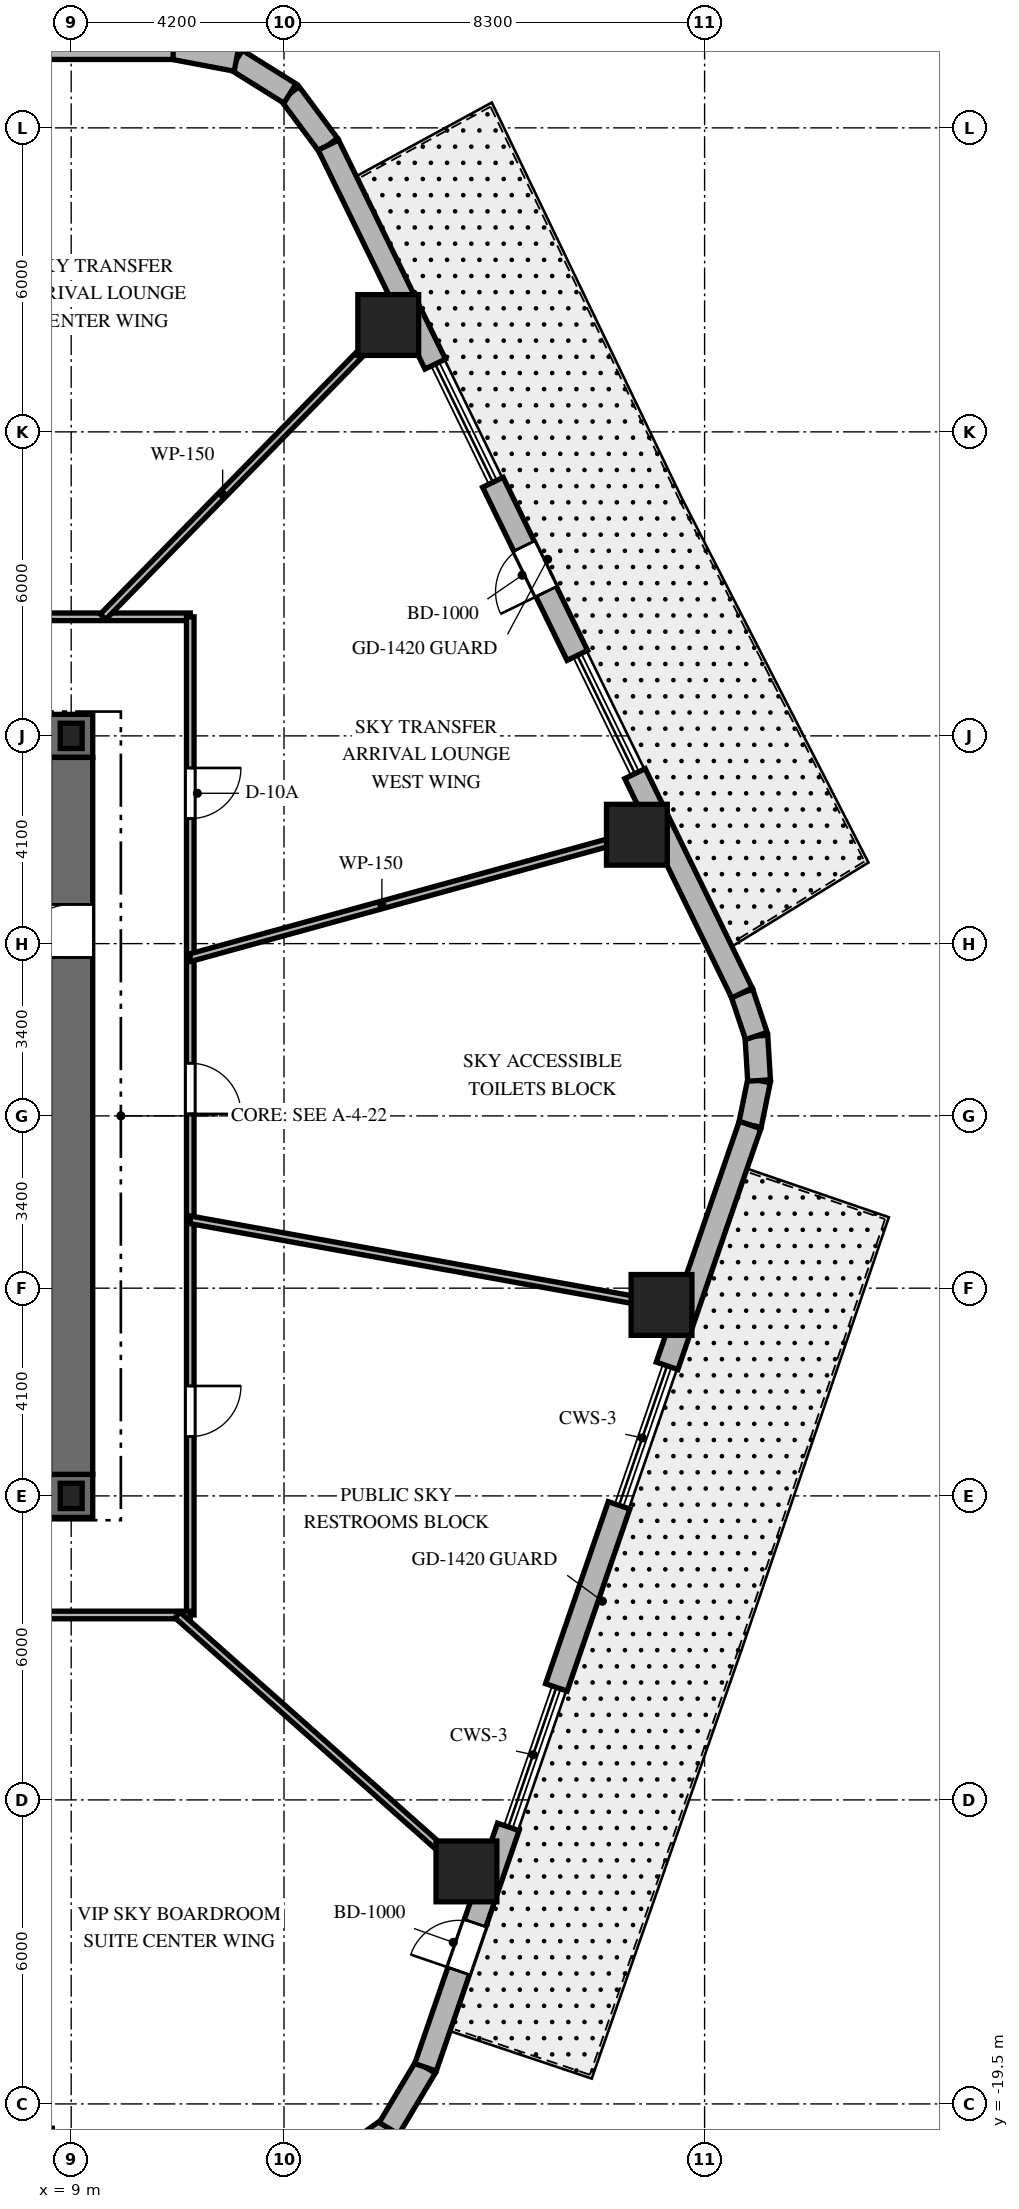
"""IFC4 building model, lengths in metres.
Left out: names, types, materials, properties, quantities, classifications, styles, units other than length and angle.
Written with IfcOpenShell. Run it as: python <this file> out.ifc"""

import sys

from ifc_helpers import new_model, si_unit, direction, frame, frame_2d, origin, origin_2d, place, context, subcontext, project, spatial, rectangle, i_section, extrude, element, fill, save


model = new_model("IFC4")
c1 = context("Model", 3, precision=1e-05, world=origin(), true_north=direction((0.0, 1.0)))
c2 = subcontext(c1, "Body", "Model", "MODEL_VIEW")
j1 = project(units=[si_unit("LENGTHUNIT", "METRE"), si_unit("PLANEANGLEUNIT", "RADIAN")], contexts=[c1])
p1 = place(None, origin())
s1 = spatial("IfcSite", under=j1, at=p1, CompositionType="ELEMENT")
p2 = place(p1, origin())
s2 = spatial("IfcBuilding", under=s1, at=p2, CompositionType="ELEMENT")
p3 = place(p2, frame((0.0, 0.0, 139.5)))
s3 = spatial("IfcBuildingStorey", under=s2, at=p3, CompositionType="ELEMENT", Elevation=139.5)
p4 = place(p3, frame((-9.425, -7.5, 0.0), z_axis=(0.0, 0.0, 1.0), x_axis=(1.0, 0.0, 0.0)))
e1 = element("IfcWall", 1, at=p4, inside=s3, PredefinedType="SHEAR", context=c2, shape_type="SweptSolid", body=[
    extrude(rectangle(XDim=18.85, YDim=0.85, at=frame_2d((9.425, 0.0))), origin(), (0.0, 0.0, 1.0), 4.8),
])
p5 = place(p4, frame((9.475, 0.0, 0.0)))
e2 = element("IfcOpeningElement", 2, at=p5, cuts=e1, PredefinedType="OPENING", context=c2, shape_type="SweptSolid", body=[
    extrude(rectangle(XDim=1.0, YDim=2.15, at=frame_2d((0.5, 1.075))), frame((0.0, 0.435, 0.0), z_axis=(0.0, -1.0, 0.0), x_axis=(1.0, 0.0, 0.0)), (0.0, 0.0, 1.0), 0.87),
])
p6 = place(p3, frame((1.85, 7.5, 0.0), z_axis=(0.0, 0.0, 1.0), x_axis=(1.0, 0.0, 0.0)))
e3 = element("IfcWall", 3, at=p6, inside=s3, PredefinedType="SHEAR", context=c2, shape_type="SweptSolid", body=[
    extrude(rectangle(XDim=7.575, YDim=0.85, at=frame_2d((3.788, 0.0))), origin(), (0.0, 0.0, 1.0), 4.8),
])
p7 = place(p3, frame((9.0, -7.075, 0.0), z_axis=(0.0, 0.0, 1.0), x_axis=(0.0, 1.0, 0.0)))
e4 = element("IfcWall", 4, at=p7, inside=s3, PredefinedType="SHEAR", context=c2, shape_type="SweptSolid", body=[
    extrude(rectangle(XDim=14.15, YDim=0.85, at=frame_2d((7.075, 0.0))), origin(), (0.0, 0.0, 1.0), 4.8),
])
p8 = place(p7, frame((10.2, 0.0, 0.0)))
e5 = element("IfcOpeningElement", 5, at=p8, cuts=e4, PredefinedType="OPENING", context=c2, shape_type="SweptSolid", body=[
    extrude(rectangle(XDim=1.05, YDim=2.15, at=frame_2d((0.525, 1.075))), frame((0.0, 0.435, 0.0), z_axis=(0.0, -1.0, 0.0), x_axis=(1.0, 0.0, 0.0)), (0.0, 0.0, 1.0), 0.87),
])
for number, where, z_axis, x_axis in (
    (6, (9.0, -7.5, 0.0), (0.0, 0.0, 1.0), (1.0, 0.0, 0.0)),
    (7, (9.0, 7.5, 0.0), (0.0, 0.0, 1.0), (1.0, 0.0, 0.0)),
):
    element("IfcColumn", number, at=place(p3, frame(where, z_axis=z_axis, x_axis=x_axis)), inside=s3, PredefinedType="COLUMN", context=c2, shape_type="SweptSolid", body=[
        extrude(i_section(OverallWidth=0.432, OverallDepth=0.498, WebThickness=0.056, FlangeThickness=0.089, at=origin_2d()), origin(), (0.0, 0.0, 1.0), 4.8),
    ])
for number, where, z_axis, x_axis in (
    (8, (8.028, -20.58, 0.0), (0.0, 0.0, 1.0), (1.0, 0.0, 0.0)),
    (9, (16.8, -14.911, 0.0), (0.0, 0.0, 1.0), (1.0, 0.0, 0.0)),
    (10, (20.65, -3.731, 0.0), (0.0, 0.0, 1.0), (1.0, 0.0, 0.0)),
    (11, (20.164, 5.549, 0.0), (0.0, 0.0, 1.0), (1.0, 0.0, 0.0)),
    (12, (15.257, 15.609, 0.0), (0.0, 0.0, 1.0), (1.0, 0.0, 0.0)),
):
    element("IfcColumn", number, at=place(p3, frame(where, z_axis=z_axis, x_axis=x_axis)), inside=s3, PredefinedType="COLUMN", context=c2, shape_type="SweptSolid", body=[
        extrude(rectangle(XDim=1.2, YDim=1.2, at=origin_2d()), origin(), (0.0, 0.0, 1.0), 4.8),
    ])
p9 = place(p3, frame((14.146, -20.787, 0.0), z_axis=(0.0, 0.0, 1.0), x_axis=(0.814162929117, 0.580636482536, 0.0)))
e13 = element("IfcWall", 13, at=p9, inside=s3, PredefinedType="SOLIDWALL", context=c2, shape_type="SweptSolid", body=[
    extrude(rectangle(XDim=1.382, YDim=0.45, at=frame_2d((0.691, 0.0))), origin(), (0.0, 0.0, 1.0), 4.5),
])
p10 = place(p3, frame((15.272, -19.984, 0.0), z_axis=(0.0, 0.0, 1.0), x_axis=(0.512579347361, 0.858639862025, 0.0)))
e14 = element("IfcWall", 14, at=p10, inside=s3, PredefinedType="SOLIDWALL", context=c2, shape_type="SweptSolid", body=[
    extrude(rectangle(XDim=1.406, YDim=0.45, at=frame_2d((0.703, 0.0))), origin(), (0.0, 0.0, 1.0), 4.5),
])
p11 = place(p3, frame((22.397, -0.179, 0.0), z_axis=(0.0, 0.0, 1.0), x_axis=(0.199313589404, 0.979935759669, 0.0)))
e15 = element("IfcWall", 15, at=p11, inside=s3, PredefinedType="SOLIDWALL", context=c2, shape_type="SweptSolid", body=[
    extrude(rectangle(XDim=0.896, YDim=0.45, at=frame_2d((0.448, 0.0))), origin(), (0.0, 0.0, 1.0), 4.5),
])
p12 = place(p3, frame((22.575, 0.698, 0.0), z_axis=(0.0, 0.0, 1.0), x_axis=(-0.060980441946, 0.998138961117, 0.0)))
e16 = element("IfcWall", 16, at=p12, inside=s3, PredefinedType="SOLIDWALL", context=c2, shape_type="SweptSolid", body=[
    extrude(rectangle(XDim=0.881, YDim=0.45, at=frame_2d((0.44, 0.0))), origin(), (0.0, 0.0, 1.0), 4.5),
])
p13 = place(p3, frame((22.522, 1.577, 0.0), z_axis=(0.0, 0.0, 1.0), x_axis=(-0.317372694837, 0.948300887151, 0.0)))
e17 = element("IfcWall", 17, at=p13, inside=s3, PredefinedType="SOLIDWALL", context=c2, shape_type="SweptSolid", body=[
    extrude(rectangle(XDim=0.896, YDim=0.45, at=frame_2d((0.448, 0.0))), origin(), (0.0, 0.0, 1.0), 4.5),
])
p14 = place(p3, frame((14.076, 19.161, 0.0), z_axis=(0.0, 0.0, 1.0), x_axis=(-0.597226657159, 0.802072515412, 0.0)))
e18 = element("IfcWall", 18, at=p14, inside=s3, PredefinedType="SOLIDWALL", context=c2, shape_type="SweptSolid", body=[
    extrude(rectangle(XDim=1.269, YDim=0.45, at=frame_2d((0.635, 0.0))), origin(), (0.0, 0.0, 1.0), 4.5),
])
p15 = place(p3, frame((13.318, 20.179, 0.0), z_axis=(0.0, 0.0, 1.0), x_axis=(-0.848031272749, 0.529946186362, 0.0)))
e19 = element("IfcWall", 19, at=p15, inside=s3, PredefinedType="SOLIDWALL", context=c2, shape_type="SweptSolid", body=[
    extrude(rectangle(XDim=1.248, YDim=0.45, at=frame_2d((0.624, 0.0))), origin(), (0.0, 0.0, 1.0), 4.5),
])
p16 = place(p3, frame((12.259, 20.84, 0.0), z_axis=(0.0, 0.0, 1.0), x_axis=(-0.982730354425, 0.185043374624, 0.0)))
e20 = element("IfcWall", 20, at=p16, inside=s3, PredefinedType="SOLIDWALL", context=c2, shape_type="SweptSolid", body=[
    extrude(rectangle(XDim=1.269, YDim=0.45, at=frame_2d((0.635, 0.0))), origin(), (0.0, 0.0, 1.0), 4.5),
])
p17 = place(p3, frame((15.992, -18.777, 0.0), z_axis=(0.0, 0.0, 1.0), x_axis=(0.325626313688, 0.945498547769, 0.0)))
e21 = element("IfcWall", 21, at=p17, inside=s3, PredefinedType="SOLIDWALL", context=c2, shape_type="SweptSolid", body=[
    extrude(rectangle(XDim=5.018, YDim=0.45, at=frame_2d((2.509, 0.0))), origin(), (0.0, 0.0, 1.0), 4.5),
])
p18 = place(p17, frame((2.009, 0.0, 0.0)))
e22 = element("IfcOpeningElement", 22, at=p18, cuts=e21, PredefinedType="OPENING", context=c2, shape_type="SweptSolid", body=[
    extrude(rectangle(XDim=1.0, YDim=2.15, at=frame_2d((0.5, 1.075))), frame((0.0, 0.235, 0.0), z_axis=(0.0, -1.0, 0.0), x_axis=(1.0, 0.0, 0.0)), (0.0, 0.0, 1.0), 0.47),
])
p19 = place(p3, frame((18.574, -11.279, 0.0), z_axis=(0.0, 0.0, 1.0), x_axis=(0.325598625093, 0.945508083169, 0.0)))
e23 = element("IfcWall", 23, at=p19, inside=s3, PredefinedType="SOLIDWALL", context=c2, shape_type="SweptSolid", body=[
    extrude(rectangle(XDim=3.8, YDim=0.45, at=frame_2d((1.9, 0.0))), origin(), (0.0, 0.0, 1.0), 4.5),
])
p20 = place(p3, frame((20.76, -4.933, 0.0), z_axis=(0.0, 0.0, 1.0), x_axis=(0.325594073587, 0.94550965053, 0.0)))
e24 = element("IfcWall", 24, at=p20, inside=s3, PredefinedType="SOLIDWALL", context=c2, shape_type="SweptSolid", body=[
    extrude(rectangle(XDim=5.028, YDim=0.45, at=frame_2d((2.514, 0.0))), origin(), (0.0, 0.0, 1.0), 4.5),
])
p21 = place(p3, frame((22.238, 2.427, 0.0), z_axis=(0.0, 0.0, 1.0), x_axis=(-0.438370693728, 0.898794267272, 0.0)))
e25 = element("IfcWall", 25, at=p21, inside=s3, PredefinedType="SOLIDWALL", context=c2, shape_type="SweptSolid", body=[
    extrude(rectangle(XDim=4.816, YDim=0.45, at=frame_2d((2.408, 0.0))), origin(), (0.0, 0.0, 1.0), 4.5),
])
p22 = place(p3, frame((18.988, 9.088, 0.0), z_axis=(0.0, 0.0, 1.0), x_axis=(-0.43837933929, 0.898790050503, 0.0)))
e26 = element("IfcWall", 26, at=p22, inside=s3, PredefinedType="SOLIDWALL", context=c2, shape_type="SweptSolid", body=[
    extrude(rectangle(XDim=3.801, YDim=0.45, at=frame_2d((1.9, 0.0))), origin(), (0.0, 0.0, 1.0), 4.5),
])
p23 = place(p22, frame((1.4, 0.0, 0.0)))
e27 = element("IfcOpeningElement", 27, at=p23, cuts=e26, PredefinedType="OPENING", context=c2, shape_type="SweptSolid", body=[
    extrude(rectangle(XDim=1.0, YDim=2.15, at=frame_2d((0.5, 1.075))), frame((0.0, 0.235, 0.0), z_axis=(0.0, -1.0, 0.0), x_axis=(1.0, 0.0, 0.0)), (0.0, 0.0, 1.0), 0.47),
])
p24 = place(p3, frame((16.184, 14.838, 0.0), z_axis=(0.0, 0.0, 1.0), x_axis=(-0.43837962648, 0.898789910428, 0.0)))
e28 = element("IfcWall", 28, at=p24, inside=s3, PredefinedType="SOLIDWALL", context=c2, shape_type="SweptSolid", body=[
    extrude(rectangle(XDim=4.81, YDim=0.45, at=frame_2d((2.405, 0.0))), origin(), (0.0, 0.0, 1.0), 4.5),
])
p25 = place(p3, frame((11.012, 21.075, 0.0), z_axis=(0.0, 0.0, 1.0), x_axis=(-1.0, 0.0, 0.0)))
e29 = element("IfcWall", 29, at=p25, inside=s3, PredefinedType="SOLIDWALL", context=c2, shape_type="SweptSolid", body=[
    extrude(rectangle(XDim=5.946, YDim=0.45, at=frame_2d((2.973, 0.0))), origin(), (0.0, 0.0, 1.0), 4.5),
])
p26 = place(p3, frame((-11.35, 9.85, 0.0), z_axis=(0.0, 0.0, 1.0), x_axis=(1.0, 0.0, 0.0)))
e30 = element("IfcWall", 30, at=p26, inside=s3, PredefinedType="PARTITIONING", context=c2, shape_type="SweptSolid", body=[
    extrude(rectangle(XDim=22.7, YDim=0.15, at=frame_2d((11.35, 0.0))), origin(), (0.0, 0.0, 1.0), 2.69),
])
p27 = place(p26, frame((17.212, 0.0, 0.0)))
e31 = element("IfcOpeningElement", 31, at=p27, cuts=e30, PredefinedType="OPENING", context=c2, shape_type="SweptSolid", body=[
    extrude(rectangle(XDim=1.0, YDim=2.03, at=frame_2d((0.5, 1.015))), frame((0.0, 0.085, 0.0), z_axis=(0.0, -1.0, 0.0), x_axis=(1.0, 0.0, 0.0)), (0.0, 0.0, 1.0), 0.17),
])
p28 = place(p26, frame((10.425, 0.0, 0.0)))
e32 = element("IfcOpeningElement", 32, at=p28, cuts=e30, PredefinedType="OPENING", context=c2, shape_type="SweptSolid", body=[
    extrude(rectangle(XDim=1.0, YDim=2.03, at=frame_2d((0.5, 1.015))), frame((0.0, 0.085, 0.0), z_axis=(0.0, -1.0, 0.0), x_axis=(1.0, 0.0, 0.0)), (0.0, 0.0, 1.0), 0.17),
])
p29 = place(p26, frame((3.374, 0.0, 0.0)))
e33 = element("IfcOpeningElement", 33, at=p29, cuts=e30, PredefinedType="OPENING", context=c2, shape_type="SweptSolid", body=[
    extrude(rectangle(XDim=1.0, YDim=2.03, at=frame_2d((0.5, 1.015))), frame((0.0, 0.085, 0.0), z_axis=(0.0, -1.0, 0.0), x_axis=(1.0, 0.0, 0.0)), (0.0, 0.0, 1.0), 0.17),
])
p30 = place(p3, frame((11.35, 9.85, 0.0), z_axis=(0.0, 0.0, 1.0), x_axis=(0.0, -1.0, 0.0)))
e34 = element("IfcWall", 34, at=p30, inside=s3, PredefinedType="PARTITIONING", context=c2, shape_type="SweptSolid", body=[
    extrude(rectangle(XDim=19.7, YDim=0.15, at=frame_2d((9.85, 0.0))), origin(), (0.0, 0.0, 1.0), 2.69),
])
p31 = place(p30, frame((2.983, 0.0, 0.0)))
e35 = element("IfcOpeningElement", 35, at=p31, cuts=e34, PredefinedType="OPENING", context=c2, shape_type="SweptSolid", body=[
    extrude(rectangle(XDim=1.0, YDim=2.03, at=frame_2d((0.5, 1.015))), frame((0.0, 0.085, 0.0), z_axis=(0.0, -1.0, 0.0), x_axis=(1.0, 0.0, 0.0)), (0.0, 0.0, 1.0), 0.17),
])
p32 = place(p30, frame((15.18, 0.0, 0.0)))
e36 = element("IfcOpeningElement", 36, at=p32, cuts=e34, PredefinedType="OPENING", context=c2, shape_type="SweptSolid", body=[
    extrude(rectangle(XDim=1.0, YDim=2.03, at=frame_2d((0.5, 1.015))), frame((0.0, 0.085, 0.0), z_axis=(0.0, -1.0, 0.0), x_axis=(1.0, 0.0, 0.0)), (0.0, 0.0, 1.0), 0.17),
])
p33 = place(p30, frame((8.811, 0.0, 0.0)))
e37 = element("IfcOpeningElement", 37, at=p33, cuts=e34, PredefinedType="OPENING", context=c2, shape_type="SweptSolid", body=[
    extrude(rectangle(XDim=1.0, YDim=2.03, at=frame_2d((0.5, 1.015))), frame((0.0, 0.085, 0.0), z_axis=(0.0, -1.0, 0.0), x_axis=(1.0, 0.0, 0.0)), (0.0, 0.0, 1.0), 0.17),
])
p34 = place(p3, frame((11.35, -9.85, 0.0), z_axis=(0.0, 0.0, 1.0), x_axis=(-1.0, 0.0, 0.0)))
e38 = element("IfcWall", 38, at=p34, inside=s3, PredefinedType="PARTITIONING", context=c2, shape_type="SweptSolid", body=[
    extrude(rectangle(XDim=22.7, YDim=0.15, at=frame_2d((11.35, 0.0))), origin(), (0.0, 0.0, 1.0), 2.69),
])
p35 = place(p34, frame((17.212, 0.0, 0.0)))
e39 = element("IfcOpeningElement", 39, at=p35, cuts=e38, PredefinedType="OPENING", context=c2, shape_type="SweptSolid", body=[
    extrude(rectangle(XDim=1.0, YDim=2.03, at=frame_2d((0.5, 1.015))), frame((0.0, 0.085, 0.0), z_axis=(0.0, -1.0, 0.0), x_axis=(1.0, 0.0, 0.0)), (0.0, 0.0, 1.0), 0.17),
])
p36 = place(p34, frame((10.425, 0.0, 0.0)))
e40 = element("IfcOpeningElement", 40, at=p36, cuts=e38, PredefinedType="OPENING", context=c2, shape_type="SweptSolid", body=[
    extrude(rectangle(XDim=1.0, YDim=2.03, at=frame_2d((0.5, 1.015))), frame((0.0, 0.085, 0.0), z_axis=(0.0, -1.0, 0.0), x_axis=(1.0, 0.0, 0.0)), (0.0, 0.0, 1.0), 0.17),
])
p37 = place(p34, frame((3.374, 0.0, 0.0)))
e41 = element("IfcOpeningElement", 41, at=p37, cuts=e38, PredefinedType="OPENING", context=c2, shape_type="SweptSolid", body=[
    extrude(rectangle(XDim=1.0, YDim=2.03, at=frame_2d((0.5, 1.015))), frame((0.0, 0.085, 0.0), z_axis=(0.0, -1.0, 0.0), x_axis=(1.0, 0.0, 0.0)), (0.0, 0.0, 1.0), 0.17),
])
p38 = place(p3, frame((11.35, 3.123, 0.0), z_axis=(0.0, 0.0, 1.0), x_axis=(0.964151983214, 0.265350623261, 0.0)))
e42 = element("IfcWall", 42, at=p38, inside=s3, PredefinedType="PARTITIONING", context=c2, shape_type="SweptSolid", body=[
    extrude(rectangle(XDim=9.645, YDim=0.15, at=frame_2d((4.823, 0.0))), origin(), (0.0, 0.0, 1.0), 2.69),
])
p39 = place(p3, frame((9.628, 9.85, 0.0), z_axis=(0.0, 0.0, 1.0), x_axis=(0.698992824326, 0.715128681805, 0.0)))
e43 = element("IfcWall", 43, at=p39, inside=s3, PredefinedType="PARTITIONING", context=c2, shape_type="SweptSolid", body=[
    extrude(rectangle(XDim=8.579, YDim=0.15, at=frame_2d((4.29, 0.0))), origin(), (0.0, 0.0, 1.0), 2.69),
])
p40 = place(p3, frame((11.098, -9.85, 0.0), z_axis=(0.0, 0.0, 1.0), x_axis=(0.747904295103, -0.663806572253, 0.0)))
e44 = element("IfcWall", 44, at=p40, inside=s3, PredefinedType="PARTITIONING", context=c2, shape_type="SweptSolid", body=[
    extrude(rectangle(XDim=8.16, YDim=0.15, at=frame_2d((4.08, 0.0))), origin(), (0.0, 0.0, 1.0), 2.69),
])
p41 = place(p3, frame((11.35, -2.051, 0.0), z_axis=(0.0, 0.0, 1.0), x_axis=(0.984068313063, -0.177790762484, 0.0)))
e45 = element("IfcWall", 45, at=p41, inside=s3, PredefinedType="PARTITIONING", context=c2, shape_type="SweptSolid", body=[
    extrude(rectangle(XDim=9.951, YDim=0.15, at=frame_2d((4.976, 0.0))), origin(), (0.0, 0.0, 1.0), 2.69),
])
p42 = place(p18, origin())
e46 = element("IfcDoor", 46, at=p42, inside=s3, OperationType="SINGLE_SWING_LEFT", PredefinedType="DOOR", context=c2, shape_type="SweptSolid", body=[
    extrude(rectangle(XDim=1.0, YDim=2.15, at=frame_2d((0.5, 1.075))), frame((0.0, 0.025, 0.0), z_axis=(0.0, -1.0, 0.0), x_axis=(1.0, 0.0, 0.0)), (0.0, 0.0, 1.0), 0.05),
])
fill(e22, e46)
p43 = place(p23, origin())
e47 = element("IfcDoor", 47, at=p43, inside=s3, OperationType="SINGLE_SWING_LEFT", PredefinedType="DOOR", context=c2, shape_type="SweptSolid", body=[
    extrude(rectangle(XDim=1.0, YDim=2.15, at=frame_2d((0.5, 1.075))), frame((0.0, 0.025, 0.0), z_axis=(0.0, -1.0, 0.0), x_axis=(1.0, 0.0, 0.0)), (0.0, 0.0, 1.0), 0.05),
])
fill(e27, e47)
p44 = place(p8, origin())
e48 = element("IfcDoor", 48, at=p44, inside=s3, OperationType="SINGLE_SWING_LEFT", PredefinedType="DOOR", context=c2, shape_type="SweptSolid", body=[
    extrude(rectangle(XDim=1.05, YDim=2.15, at=frame_2d((0.525, 1.075))), frame((0.0, 0.025, 0.0), z_axis=(0.0, -1.0, 0.0), x_axis=(1.0, 0.0, 0.0)), (0.0, 0.0, 1.0), 0.05),
])
fill(e5, e48)
p45 = place(p31, origin())
e49 = element("IfcDoor", 49, at=p45, inside=s3, OperationType="SINGLE_SWING_LEFT", PredefinedType="DOOR", context=c2, shape_type="SweptSolid", body=[
    extrude(rectangle(XDim=1.0, YDim=2.03, at=frame_2d((0.5, 1.015))), frame((0.0, 0.025, 0.0), z_axis=(0.0, -1.0, 0.0), x_axis=(1.0, 0.0, 0.0)), (0.0, 0.0, 1.0), 0.05),
])
fill(e35, e49)
p46 = place(p32, origin())
e50 = element("IfcDoor", 50, at=p46, inside=s3, OperationType="SINGLE_SWING_LEFT", PredefinedType="DOOR", context=c2, shape_type="SweptSolid", body=[
    extrude(rectangle(XDim=1.0, YDim=2.03, at=frame_2d((0.5, 1.015))), frame((0.0, 0.025, 0.0), z_axis=(0.0, -1.0, 0.0), x_axis=(1.0, 0.0, 0.0)), (0.0, 0.0, 1.0), 0.05),
])
fill(e36, e50)
p47 = place(p33, origin())
e51 = element("IfcDoor", 51, at=p47, inside=s3, OperationType="SINGLE_SWING_RIGHT", PredefinedType="DOOR", context=c2, shape_type="SweptSolid", body=[
    extrude(rectangle(XDim=1.0, YDim=2.03, at=frame_2d((0.5, 1.015))), frame((0.0, 0.025, 0.0), z_axis=(0.0, -1.0, 0.0), x_axis=(1.0, 0.0, 0.0)), (0.0, 0.0, 1.0), 0.05),
])
fill(e37, e51)
save(model, sys.argv[1])
